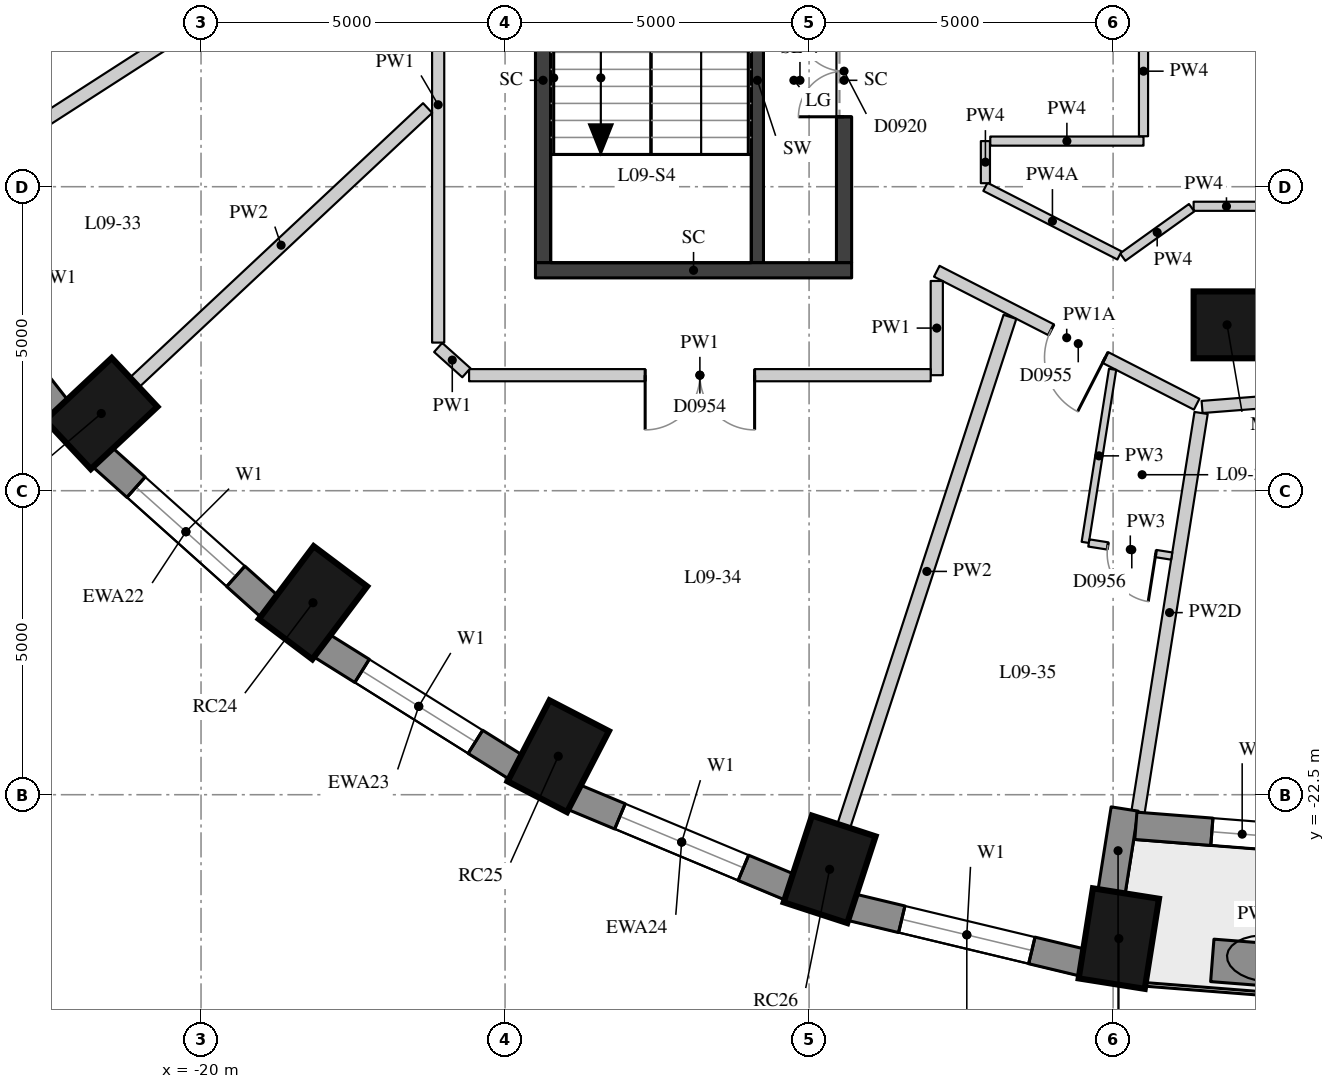
"""IFC4 building model, lengths in metres.
Left out: names, types, materials, properties, quantities, classifications, styles, units other than length and angle.
Written with IfcOpenShell. Run it as: python <this file> out.ifc"""

import sys

from ifc_helpers import new_model, si_unit, direction, frame, frame_2d, origin, origin_2d, place, context, subcontext, project, spatial, rectangle, extrude, element, fill, save


model = new_model("IFC4")
c1 = context("Model", 3, precision=1e-05, world=origin(), true_north=direction((0.0, 1.0)))
c2 = subcontext(c1, "Body", "Model", "MODEL_VIEW")
j1 = project(units=[si_unit("LENGTHUNIT", "METRE"), si_unit("PLANEANGLEUNIT", "RADIAN")], contexts=[c1])
p1 = place(None, origin())
s1 = spatial("IfcSite", under=j1, at=p1, CompositionType="ELEMENT")
p2 = place(p1, origin())
s2 = spatial("IfcBuilding", under=s1, at=p2, CompositionType="ELEMENT")
p3 = place(p2, frame((0.0, 0.0, 38.2)))
s3 = spatial("IfcBuildingStorey", under=s2, at=p3, CompositionType="ELEMENT", Elevation=38.2)
for number, where, z_axis, x_axis in (
    (1, (-21.641, -16.23, 0.0), (0.0, 0.0, 1.0), (-0.73, -0.683, 0.0)),
    (2, (-18.159, -19.343, 0.0), (0.0, 0.0, 1.0), (-0.601, -0.799, 0.0)),
    (3, (-14.125, -21.867, 0.0), (0.0, 0.0, 1.0), (-0.46, -0.888, 0.0)),
    (4, (-9.662, -23.727, 0.0), (0.0, 0.0, 1.0), (-0.31, -0.951, 0.0)),
    (5, (-4.906, -24.866, 0.0), (0.0, 0.0, 1.0), (-0.156, -0.988, 0.0)),
):
    element("IfcColumn", number, at=place(p3, frame(where, z_axis=z_axis, x_axis=x_axis)), inside=s3, PredefinedType="COLUMN", context=c2, shape_type="SweptSolid", body=[
        extrude(rectangle(XDim=1.5, YDim=1.1, at=origin_2d()), origin(), (0.0, 0.0, 1.0), 3.3),
    ])
p4 = place(p3, frame((-3.126, -14.772, 0.0), z_axis=(0.0, 0.0, 1.0), x_axis=(1.0, 0.0, 0.0)))
e6 = element("IfcColumn", 6, at=p4, inside=s3, PredefinedType="COLUMN", context=c2, shape_type="SweptSolid", body=[
    extrude(rectangle(XDim=1.1, YDim=1.1, at=origin_2d()), origin(), (0.0, 0.0, 1.0), 3.3),
])
p5 = place(p3, frame((-24.578, -13.328, 0.0), z_axis=(0.0, 0.0, 1.0), x_axis=(0.616661975264, -0.787228053529, 0.0)))
e7 = element("IfcWall", 7, at=p5, inside=s3, PredefinedType="SOLIDWALL", context=c2, shape_type="SweptSolid", body=[
    extrude(rectangle(XDim=3.61, YDim=0.45, at=frame_2d((1.805, 0.0))), origin(), (0.0, 0.0, 1.0), 3.02),
])
p6 = place(p5, frame((0.705, 0.0, 0.4)))
e8 = element("IfcOpeningElement", 8, at=p6, cuts=e7, PredefinedType="OPENING", context=c2, shape_type="SweptSolid", body=[
    extrude(rectangle(XDim=2.2, YDim=1.75, at=frame_2d((1.1, 0.875))), frame((0.0, 0.235, 0.0), z_axis=(0.0, -1.0, 0.0), x_axis=(1.0, 0.0, 0.0)), (0.0, 0.0, 1.0), 0.47),
])
p7 = place(p3, frame((-21.627, -16.943, 0.0), z_axis=(0.0, 0.0, 1.0), x_axis=(0.745526233716, -0.66647628228, 0.0)))
e9 = element("IfcWall", 9, at=p7, inside=s3, PredefinedType="SOLIDWALL", context=c2, shape_type="SweptSolid", body=[
    extrude(rectangle(XDim=3.697, YDim=0.45, at=frame_2d((1.848, 0.0))), origin(), (0.0, 0.0, 1.0), 3.02),
])
p8 = place(p7, frame((0.749, 0.0, 0.4)))
e10 = element("IfcOpeningElement", 10, at=p8, cuts=e9, PredefinedType="OPENING", context=c2, shape_type="SweptSolid", body=[
    extrude(rectangle(XDim=2.2, YDim=1.75, at=frame_2d((1.1, 0.875))), frame((0.0, 0.235, 0.0), z_axis=(0.0, -1.0, 0.0), x_axis=(1.0, 0.0, 0.0)), (0.0, 0.0, 1.0), 0.47),
])
p9 = place(p3, frame((-18.023, -20.044, 0.0), z_axis=(0.0, 0.0, 1.0), x_axis=(0.847635480093, -0.530579016629, 0.0)))
e11 = element("IfcWall", 11, at=p9, inside=s3, PredefinedType="SOLIDWALL", context=c2, shape_type="SweptSolid", body=[
    extrude(rectangle(XDim=3.782, YDim=0.45, at=frame_2d((1.891, 0.0))), origin(), (0.0, 0.0, 1.0), 3.02),
])
p10 = place(p9, frame((0.791, 0.0, 0.4)))
e12 = element("IfcOpeningElement", 12, at=p10, cuts=e11, PredefinedType="OPENING", context=c2, shape_type="SweptSolid", body=[
    extrude(rectangle(XDim=2.2, YDim=1.75, at=frame_2d((1.1, 0.875))), frame((0.0, 0.235, 0.0), z_axis=(0.0, -1.0, 0.0), x_axis=(1.0, 0.0, 0.0)), (0.0, 0.0, 1.0), 0.47),
])
p11 = place(p3, frame((-13.875, -22.537, 0.0), z_axis=(0.0, 0.0, 1.0), x_axis=(0.923031964282, -0.384723267966, 0.0)))
e13 = element("IfcWall", 13, at=p11, inside=s3, PredefinedType="SOLIDWALL", context=c2, shape_type="SweptSolid", body=[
    extrude(rectangle(XDim=3.856, YDim=0.45, at=frame_2d((1.928, 0.0))), origin(), (0.0, 0.0, 1.0), 3.02),
])
p12 = place(p11, frame((0.828, 0.0, 0.4)))
e14 = element("IfcOpeningElement", 14, at=p12, cuts=e13, PredefinedType="OPENING", context=c2, shape_type="SweptSolid", body=[
    extrude(rectangle(XDim=2.2, YDim=1.75, at=frame_2d((1.1, 0.875))), frame((0.0, 0.235, 0.0), z_axis=(0.0, -1.0, 0.0), x_axis=(1.0, 0.0, 0.0)), (0.0, 0.0, 1.0), 0.47),
])
p13 = place(p3, frame((-9.308, -24.35, 0.0), z_axis=(0.0, 0.0, 1.0), x_axis=(0.972496561493, -0.232917233979, 0.0)))
e15 = element("IfcWall", 15, at=p13, inside=s3, PredefinedType="SOLIDWALL", context=c2, shape_type="SweptSolid", body=[
    extrude(rectangle(XDim=3.911, YDim=0.45, at=frame_2d((1.956, 0.0))), origin(), (0.0, 0.0, 1.0), 3.02),
])
p14 = place(p13, frame((0.855, 0.0, 0.4)))
e16 = element("IfcOpeningElement", 16, at=p14, cuts=e15, PredefinedType="OPENING", context=c2, shape_type="SweptSolid", body=[
    extrude(rectangle(XDim=2.2, YDim=1.75, at=frame_2d((1.1, 0.875))), frame((0.0, 0.235, 0.0), z_axis=(0.0, -1.0, 0.0), x_axis=(1.0, 0.0, 0.0)), (0.0, 0.0, 1.0), 0.47),
])
p15 = place(p3, frame((-5.027, -24.108, 0.0), z_axis=(0.0, 0.0, 1.0), x_axis=(0.156133927791, 0.98773589415, 0.0)))
e17 = element("IfcWall", 17, at=p15, inside=s3, PredefinedType="SOLIDWALL", context=c2, shape_type="SweptSolid", body=[
    extrude(rectangle(XDim=1.39, YDim=0.45, at=frame_2d((0.695, 0.0))), origin(), (0.0, 0.0, 1.0), 2.47),
])
p16 = place(p3, frame((-4.626, -23.011, 0.0), z_axis=(0.0, 0.0, 1.0), x_axis=(0.996937095772, -0.078207589615, 0.0)))
e18 = element("IfcWall", 18, at=p16, inside=s3, PredefinedType="SOLIDWALL", context=c2, shape_type="SweptSolid", body=[
    extrude(rectangle(XDim=4.657, YDim=0.45, at=frame_2d((2.329, 0.0))), origin(), (0.0, 0.0, 1.0), 3.02),
])
p17 = place(p16, frame((1.254, 0.0, 0.4)))
e19 = element("IfcOpeningElement", 19, at=p17, cuts=e18, PredefinedType="OPENING", context=c2, shape_type="SweptSolid", body=[
    extrude(rectangle(XDim=1.0, YDim=1.75, at=frame_2d((0.5, 0.875))), frame((0.0, 0.235, 0.0), z_axis=(0.0, -1.0, 0.0), x_axis=(1.0, 0.0, 0.0)), (0.0, 0.0, 1.0), 0.47),
])
p18 = place(p16, frame((2.404, 0.0, 0.0)))
e20 = element("IfcOpeningElement", 20, at=p18, cuts=e18, PredefinedType="OPENING", context=c2, shape_type="SweptSolid", body=[
    extrude(rectangle(XDim=1.0, YDim=2.15, at=frame_2d((0.5, 1.075))), frame((0.0, 0.235, 0.0), z_axis=(0.0, -1.0, 0.0), x_axis=(1.0, 0.0, 0.0)), (0.0, 0.0, 1.0), 0.47),
])
p19 = place(p3, frame((-3.369, -25.225, 0.0), z_axis=(0.0, 0.0, 1.0), x_axis=(0.996965267018, -0.077847648384, 0.0)))
e21 = element("IfcWall", 21, at=p19, inside=s3, PredefinedType="USERDEFINED", context=c2, shape_type="SweptSolid", body=[
    extrude(rectangle(XDim=1.8, YDim=0.7, at=frame_2d((0.9, 0.0))), origin(), (0.0, 0.0, 1.0), 0.75),
])
p20 = place(p3, frame((-10.85, -13.75, 0.0), z_axis=(0.0, 0.0, 1.0), x_axis=(0.0, 1.0, 0.0)))
e22 = element("IfcWall", 22, at=p20, inside=s3, PredefinedType="SHEAR", context=c2, shape_type="SweptSolid", body=[
    extrude(rectangle(XDim=6.0, YDim=0.2, at=frame_2d((3.0, 0.0))), origin(), (0.0, 0.0, 1.0), 3.02),
])
p21 = place(p20, frame((4.4, 0.0, 0.0)))
e23 = element("IfcOpeningElement", 23, at=p21, cuts=e22, PredefinedType="OPENING", context=c2, shape_type="SweptSolid", body=[
    extrude(rectangle(XDim=1.5, YDim=2.1, at=frame_2d((0.75, 1.05))), frame((0.0, 0.11, 0.0), z_axis=(0.0, -1.0, 0.0), x_axis=(1.0, 0.0, 0.0)), (0.0, 0.0, 1.0), 0.22),
])
p22 = place(p3, frame((-14.375, -13.75, -0.28), z_axis=(0.0, 0.0, 1.0), x_axis=(0.0, 1.0, 0.0)))
e24 = element("IfcWall", 24, at=p22, inside=s3, PredefinedType="SHEAR", context=c2, shape_type="SweptSolid", body=[
    extrude(rectangle(XDim=6.0, YDim=0.25, at=frame_2d((3.0, 0.0))), origin(), (0.0, 0.0, 1.0), 3.3),
])
p23 = place(p3, frame((-9.425, -13.75, -0.28), z_axis=(0.0, 0.0, 1.0), x_axis=(0.0, 1.0, 0.0)))
e25 = element("IfcWall", 25, at=p23, inside=s3, PredefinedType="SHEAR", context=c2, shape_type="SweptSolid", body=[
    extrude(rectangle(XDim=6.0, YDim=0.25, at=frame_2d((3.0, 0.0))), origin(), (0.0, 0.0, 1.0), 3.3),
])
p24 = place(p23, frame((2.4, 0.0, 0.28)))
e26 = element("IfcOpeningElement", 26, at=p24, cuts=e25, PredefinedType="OPENING", context=c2, shape_type="SweptSolid", body=[
    extrude(rectangle(XDim=1.5, YDim=2.1, at=frame_2d((0.75, 1.05))), frame((0.0, 0.135, 0.0), z_axis=(0.0, -1.0, 0.0), x_axis=(1.0, 0.0, 0.0)), (0.0, 0.0, 1.0), 0.27),
])
p25 = place(p3, frame((-14.5, -13.875, -0.28), z_axis=(0.0, 0.0, 1.0), x_axis=(1.0, 0.0, 0.0)))
e27 = element("IfcWall", 27, at=p25, inside=s3, PredefinedType="SHEAR", context=c2, shape_type="SweptSolid", body=[
    extrude(rectangle(XDim=5.2, YDim=0.25, at=frame_2d((2.6, 0.0))), origin(), (0.0, 0.0, 1.0), 3.3),
])
p26 = place(p3, frame((6.84, -15.313, 0.0), z_axis=(0.0, 0.0, 1.0), x_axis=(-0.996968882229, -0.077801335898, 0.0)))
e28 = element("IfcWall", 28, at=p26, inside=s3, PredefinedType="PARTITIONING", context=c2, shape_type="SweptSolid", body=[
    extrude(rectangle(XDim=10.409, YDim=0.2, at=frame_2d((5.204, 0.0))), origin(), (0.0, 0.0, 1.0), 3.02),
])
p27 = place(p26, frame((5.773, 0.0, 0.0)))
e29 = element("IfcOpeningElement", 29, at=p27, cuts=e28, PredefinedType="OPENING", context=c2, shape_type="SweptSolid", body=[
    extrude(rectangle(XDim=1.1, YDim=2.1, at=frame_2d((0.55, 1.05))), frame((0.0, 0.11, 0.0), z_axis=(0.0, -1.0, 0.0), x_axis=(1.0, 0.0, 0.0)), (0.0, 0.0, 1.0), 0.22),
])
p28 = place(p26, frame((1.255, 0.0, 0.0)))
e30 = element("IfcOpeningElement", 30, at=p28, cuts=e28, PredefinedType="OPENING", context=c2, shape_type="SweptSolid", body=[
    extrude(rectangle(XDim=0.9, YDim=2.1, at=frame_2d((0.45, 1.05))), frame((0.0, 0.11, 0.0), z_axis=(0.0, -1.0, 0.0), x_axis=(1.0, 0.0, 0.0)), (0.0, 0.0, 1.0), 0.22),
])
p29 = place(p3, frame((-3.626, -16.078, 0.0), z_axis=(0.0, 0.0, 1.0), x_axis=(-0.890197807844, 0.455574212297, 0.0)))
e31 = element("IfcWall", 31, at=p29, inside=s3, PredefinedType="PARTITIONING", context=c2, shape_type="SweptSolid", body=[
    extrude(rectangle(XDim=4.801, YDim=0.2, at=frame_2d((2.4, 0.0))), origin(), (0.0, 0.0, 1.0), 2.57),
])
p30 = place(p29, frame((1.688, 0.0, 0.0)))
e32 = element("IfcOpeningElement", 32, at=p30, cuts=e31, PredefinedType="OPENING", context=c2, shape_type="SweptSolid", body=[
    extrude(rectangle(XDim=1.0, YDim=2.1, at=frame_2d((0.5, 1.05))), frame((0.0, 0.11, 0.0), z_axis=(0.0, -1.0, 0.0), x_axis=(1.0, 0.0, 0.0)), (0.0, 0.0, 1.0), 0.22),
])
p31 = place(p3, frame((-7.9, -14.051, 0.0), z_axis=(0.0, 0.0, 1.0), x_axis=(0.0, -1.0, 0.0)))
e33 = element("IfcWall", 33, at=p31, inside=s3, PredefinedType="PARTITIONING", context=c2, shape_type="SweptSolid", body=[
    extrude(rectangle(XDim=1.55, YDim=0.2, at=frame_2d((0.775, 0.0))), origin(), (0.0, 0.0, 1.0), 3.02),
])
p32 = place(p3, frame((-8.0, -15.6, 0.0), z_axis=(0.0, 0.0, 1.0), x_axis=(-1.0, 0.0, 0.0)))
e34 = element("IfcWall", 34, at=p32, inside=s3, PredefinedType="PARTITIONING", context=c2, shape_type="SweptSolid", body=[
    extrude(rectangle(XDim=7.592, YDim=0.2, at=frame_2d((3.796, 0.0))), origin(), (0.0, 0.0, 1.0), 3.02),
])
p33 = place(p32, frame((2.896, 0.0, 0.0)))
e35 = element("IfcOpeningElement", 35, at=p33, cuts=e34, PredefinedType="OPENING", context=c2, shape_type="SweptSolid", body=[
    extrude(rectangle(XDim=1.8, YDim=2.1, at=frame_2d((0.9, 1.05))), frame((0.0, 0.11, 0.0), z_axis=(0.0, -1.0, 0.0), x_axis=(1.0, 0.0, 0.0)), (0.0, 0.0, 1.0), 0.22),
])
p34 = place(p3, frame((-15.636, -15.56, 0.0), z_axis=(0.0, 0.0, 1.0), x_axis=(-0.744656758283, 0.667447610187, 0.0)))
e36 = element("IfcWall", 36, at=p34, inside=s3, PredefinedType="PARTITIONING", context=c2, shape_type="SweptSolid", body=[
    extrude(rectangle(XDim=0.623, YDim=0.2, at=frame_2d((0.312, 0.0))), origin(), (0.0, 0.0, 1.0), 3.02),
])
p35 = place(p3, frame((-16.1, -15.064, 0.0), z_axis=(0.0, 0.0, 1.0), x_axis=(0.0, 1.0, 0.0)))
e37 = element("IfcWall", 37, at=p35, inside=s3, PredefinedType="PARTITIONING", context=c2, shape_type="SweptSolid", body=[
    extrude(rectangle(XDim=7.823, YDim=0.2, at=frame_2d((3.912, 0.0))), origin(), (0.0, 0.0, 1.0), 3.02),
])
p36 = place(p35, frame((5.464, 0.0, 0.0)))
e38 = element("IfcOpeningElement", 38, at=p36, cuts=e37, PredefinedType="OPENING", context=c2, shape_type="SweptSolid", body=[
    extrude(rectangle(XDim=0.9, YDim=2.1, at=frame_2d((0.45, 1.05))), frame((0.0, 0.11, 0.0), z_axis=(0.0, -1.0, 0.0), x_axis=(1.0, 0.0, 0.0)), (0.0, 0.0, 1.0), 0.22),
])
p37 = place(p3, frame((-2.596, -12.822, 0.0), z_axis=(0.0, 0.0, 1.0), x_axis=(-1.0, 0.0, 0.0)))
e39 = element("IfcWall", 39, at=p37, inside=s3, PredefinedType="PARTITIONING", context=c2, shape_type="SweptSolid", body=[
    extrude(rectangle(XDim=1.08, YDim=0.15, at=frame_2d((0.54, 0.0))), origin(), (0.0, 0.0, 1.0), 3.02),
])
p38 = place(p3, frame((-3.708, -12.845, 0.0), z_axis=(0.0, 0.0, 1.0), x_axis=(-0.812857190658, -0.58246303539, 0.0)))
e40 = element("IfcWall", 40, at=p38, inside=s3, PredefinedType="PARTITIONING", context=c2, shape_type="SweptSolid", body=[
    extrude(rectangle(XDim=1.395, YDim=0.15, at=frame_2d((0.697, 0.0))), origin(), (0.0, 0.0, 1.0), 3.02),
])
p39 = place(p3, frame((-4.896, -13.631, 0.0), z_axis=(0.0, 0.0, 1.0), x_axis=(-0.890208185307, 0.455553934032, 0.0)))
e41 = element("IfcWall", 41, at=p39, inside=s3, PredefinedType="PARTITIONING", context=c2, shape_type="SweptSolid", body=[
    extrude(rectangle(XDim=2.477, YDim=0.15, at=frame_2d((1.238, 0.0))), origin(), (0.0, 0.0, 1.0), 2.57),
])
p40 = place(p3, frame((-7.1, -12.442, 0.0), z_axis=(0.0, 0.0, 1.0), x_axis=(0.0, 1.0, 0.0)))
e42 = element("IfcWall", 42, at=p40, inside=s3, PredefinedType="PARTITIONING", context=c2, shape_type="SweptSolid", body=[
    extrude(rectangle(XDim=0.692, YDim=0.15, at=frame_2d((0.346, 0.0))), origin(), (0.0, 0.0, 1.0), 3.02),
])
p41 = place(p3, frame((-7.02, -11.75, 0.0), z_axis=(0.0, 0.0, 1.0), x_axis=(1.0, 0.0, 0.0)))
e43 = element("IfcWall", 43, at=p41, inside=s3, PredefinedType="PARTITIONING", context=c2, shape_type="SweptSolid", body=[
    extrude(rectangle(XDim=2.52, YDim=0.15, at=frame_2d((1.26, 0.0))), origin(), (0.0, 0.0, 1.0), 3.02),
])
p42 = place(p3, frame((-4.5, -11.67, 0.0), z_axis=(0.0, 0.0, 1.0), x_axis=(0.0, 1.0, 0.0)))
e44 = element("IfcWall", 44, at=p42, inside=s3, PredefinedType="PARTITIONING", context=c2, shape_type="SweptSolid", body=[
    extrude(rectangle(XDim=2.14, YDim=0.15, at=frame_2d((1.07, 0.0))), origin(), (0.0, 0.0, 1.0), 3.02),
])
p43 = place(p3, frame((-23.835, -12.219, 0.0), z_axis=(0.0, 0.0, 1.0), x_axis=(0.840731477632, 0.541452290159, 0.0)))
e45 = element("IfcWall", 45, at=p43, inside=s3, PredefinedType="PARTITIONING", context=c2, shape_type="SweptSolid", body=[
    extrude(rectangle(XDim=9.021, YDim=0.22, at=frame_2d((4.51, 0.0))), origin(), (0.0, 0.0, 1.0), 3.02),
])
p44 = place(p3, frame((-21.093, -15.718, 0.0), z_axis=(0.0, 0.0, 1.0), x_axis=(0.73009284205, 0.683347965525, 0.0)))
e46 = element("IfcWall", 46, at=p44, inside=s3, PredefinedType="PARTITIONING", context=c2, shape_type="SweptSolid", body=[
    extrude(rectangle(XDim=6.602, YDim=0.22, at=frame_2d((3.301, 0.0))), origin(), (0.0, 0.0, 1.0), 3.02),
])
p45 = place(p3, frame((-9.429, -23.014, 0.0), z_axis=(0.0, 0.0, 1.0), x_axis=(0.310242805557, 0.950657352362, 0.0)))
e47 = element("IfcWall", 47, at=p45, inside=s3, PredefinedType="PARTITIONING", context=c2, shape_type="SweptSolid", body=[
    extrude(rectangle(XDim=8.808, YDim=0.22, at=frame_2d((4.404, 0.0))), origin(), (0.0, 0.0, 1.0), 3.02),
])
p46 = place(p3, frame((-4.591, -22.789, 0.0), z_axis=(0.0, 0.0, 1.0), x_axis=(0.156104000092, 0.987740624433, 0.0)))
e48 = element("IfcWall", 48, at=p46, inside=s3, PredefinedType="PARTITIONING", context=c2, shape_type="SweptSolid", body=[
    extrude(rectangle(XDim=6.648, YDim=0.22, at=frame_2d((3.324, 0.0))), origin(), (0.0, 0.0, 1.0), 2.47),
])
p47 = place(p3, frame((-5.008, -15.504, 0.0), z_axis=(0.0, 0.0, 1.0), x_axis=(-0.156219239615, -0.987722404917, 0.0)))
e49 = element("IfcWall", 49, at=p47, inside=s3, PredefinedType="PARTITIONING", context=c2, shape_type="SweptSolid", body=[
    extrude(rectangle(XDim=2.882, YDim=0.12, at=frame_2d((1.441, 0.0))), origin(), (0.0, 0.0, 1.0), 3.02),
])
p48 = place(p3, frame((-5.399, -18.359, 0.0), z_axis=(0.0, 0.0, 1.0), x_axis=(0.987722767831, -0.156216945011, 0.0)))
e50 = element("IfcWall", 50, at=p48, inside=s3, PredefinedType="PARTITIONING", context=c2, shape_type="SweptSolid", body=[
    extrude(rectangle(XDim=1.38, YDim=0.12, at=frame_2d((0.69, 0.0))), origin(), (0.0, 0.0, 1.0), 3.02),
])
p49 = place(p48, frame((0.315, 0.0, 0.0)))
e51 = element("IfcOpeningElement", 51, at=p49, cuts=e50, PredefinedType="OPENING", context=c2, shape_type="SweptSolid", body=[
    extrude(rectangle(XDim=0.8, YDim=2.1, at=frame_2d((0.4, 1.05))), frame((0.0, 0.07, 0.0), z_axis=(0.0, -1.0, 0.0), x_axis=(1.0, 0.0, 0.0)), (0.0, 0.0, 1.0), 0.14),
])
p50 = place(p8, origin())
e52 = element("IfcWindow", 52, at=p50, inside=s3, PartitioningType="SINGLE_PANEL", PredefinedType="WINDOW", context=c2, shape_type="SweptSolid", body=[
    extrude(rectangle(XDim=2.2, YDim=1.75, at=frame_2d((1.1, 0.875))), frame((0.0, 0.035, 0.0), z_axis=(0.0, -1.0, 0.0), x_axis=(1.0, 0.0, 0.0)), (0.0, 0.0, 1.0), 0.06),
])
fill(e10, e52)
p51 = place(p10, origin())
e53 = element("IfcWindow", 53, at=p51, inside=s3, PartitioningType="SINGLE_PANEL", PredefinedType="WINDOW", context=c2, shape_type="SweptSolid", body=[
    extrude(rectangle(XDim=2.2, YDim=1.75, at=frame_2d((1.1, 0.875))), frame((0.0, 0.035, 0.0), z_axis=(0.0, -1.0, 0.0), x_axis=(1.0, 0.0, 0.0)), (0.0, 0.0, 1.0), 0.06),
])
fill(e12, e53)
p52 = place(p12, origin())
e54 = element("IfcWindow", 54, at=p52, inside=s3, PartitioningType="SINGLE_PANEL", PredefinedType="WINDOW", context=c2, shape_type="SweptSolid", body=[
    extrude(rectangle(XDim=2.2, YDim=1.75, at=frame_2d((1.1, 0.875))), frame((0.0, 0.035, 0.0), z_axis=(0.0, -1.0, 0.0), x_axis=(1.0, 0.0, 0.0)), (0.0, 0.0, 1.0), 0.06),
])
fill(e14, e54)
p53 = place(p14, origin())
e55 = element("IfcWindow", 55, at=p53, inside=s3, PartitioningType="SINGLE_PANEL", PredefinedType="WINDOW", context=c2, shape_type="SweptSolid", body=[
    extrude(rectangle(XDim=2.2, YDim=1.75, at=frame_2d((1.1, 0.875))), frame((0.0, 0.035, 0.0), z_axis=(0.0, -1.0, 0.0), x_axis=(1.0, 0.0, 0.0)), (0.0, 0.0, 1.0), 0.06),
])
fill(e16, e55)
p54 = place(p17, origin())
e56 = element("IfcWindow", 56, at=p54, inside=s3, PartitioningType="SINGLE_PANEL", PredefinedType="WINDOW", context=c2, shape_type="SweptSolid", body=[
    extrude(rectangle(XDim=1.0, YDim=1.75, at=frame_2d((0.5, 0.875))), frame((0.0, 0.035, 0.0), z_axis=(0.0, -1.0, 0.0), x_axis=(1.0, 0.0, 0.0)), (0.0, 0.0, 1.0), 0.06),
])
fill(e19, e56)
p55 = place(p24, origin())
e57 = element("IfcDoor", 57, at=p55, inside=s3, OperationType="DOUBLE_DOOR_SINGLE_SWING", PredefinedType="DOOR", context=c2, shape_type="SweptSolid", body=[
    extrude(rectangle(XDim=1.5, YDim=2.1, at=frame_2d((0.75, 1.05))), frame((0.0, 0.025, 0.0), z_axis=(0.0, -1.0, 0.0), x_axis=(1.0, 0.0, 0.0)), (0.0, 0.0, 1.0), 0.05),
])
fill(e26, e57)
p56 = place(p33, origin())
e58 = element("IfcDoor", 58, at=p56, inside=s3, OperationType="DOUBLE_DOOR_SINGLE_SWING", PredefinedType="DOOR", context=c2, shape_type="SweptSolid", body=[
    extrude(rectangle(XDim=1.8, YDim=2.1, at=frame_2d((0.9, 1.05))), frame((0.0, 0.025, 0.0), z_axis=(0.0, -1.0, 0.0), x_axis=(1.0, 0.0, 0.0)), (0.0, 0.0, 1.0), 0.05),
])
fill(e35, e58)
p57 = place(p30, origin())
e59 = element("IfcDoor", 59, at=p57, inside=s3, OperationType="SINGLE_SWING_LEFT", PredefinedType="DOOR", context=c2, shape_type="SweptSolid", body=[
    extrude(rectangle(XDim=1.0, YDim=2.1, at=frame_2d((0.5, 1.05))), frame((0.0, 0.025, 0.0), z_axis=(0.0, -1.0, 0.0), x_axis=(1.0, 0.0, 0.0)), (0.0, 0.0, 1.0), 0.05),
])
fill(e32, e59)
p58 = place(p49, origin())
e60 = element("IfcDoor", 60, at=p58, inside=s3, OperationType="SINGLE_SWING_LEFT", PredefinedType="DOOR", context=c2, shape_type="SweptSolid", body=[
    extrude(rectangle(XDim=0.8, YDim=2.1, at=frame_2d((0.4, 1.05))), frame((0.0, 0.025, 0.0), z_axis=(0.0, -1.0, 0.0), x_axis=(1.0, 0.0, 0.0)), (0.0, 0.0, 1.0), 0.05),
])
fill(e51, e60)
save(model, sys.argv[1])
